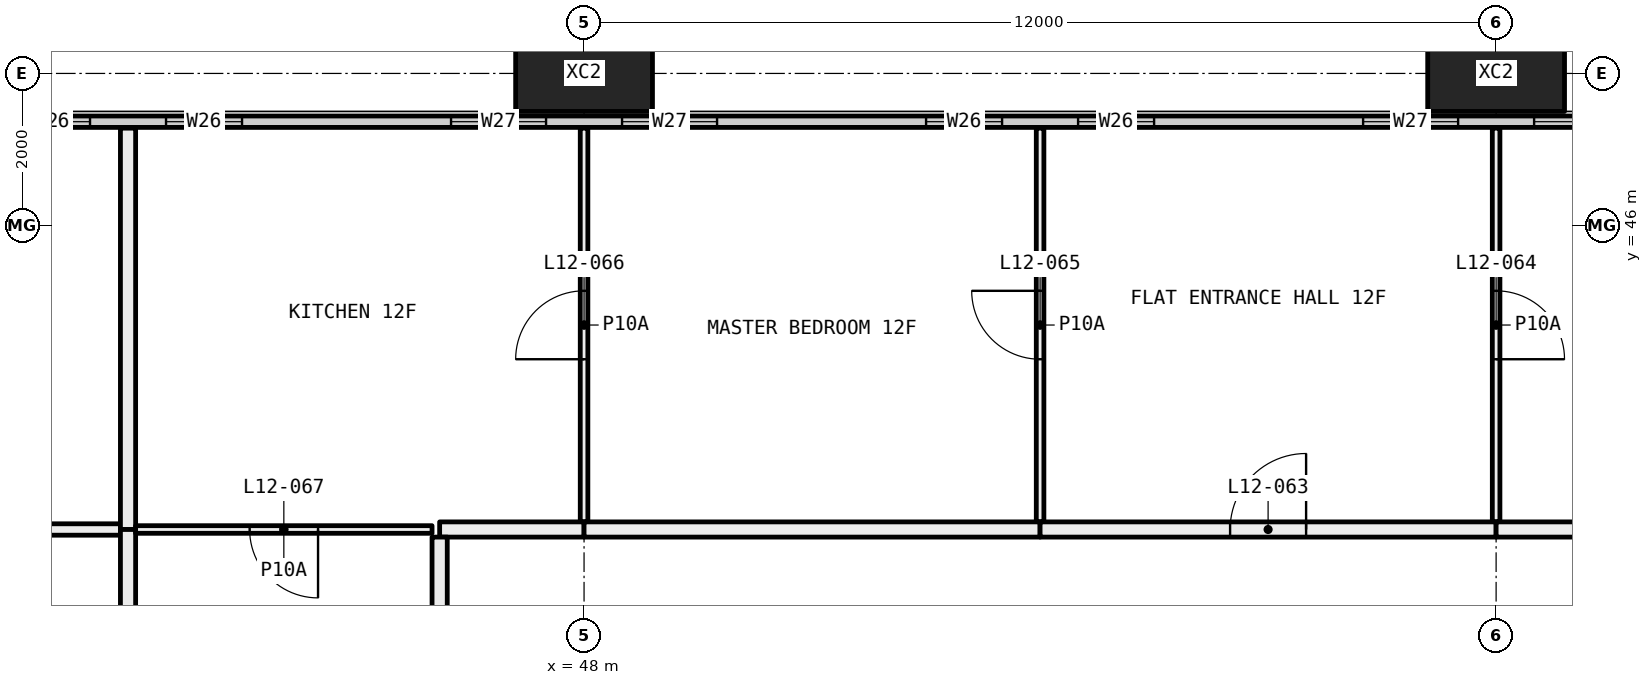
"""IFC4 building model, lengths in metres.
Left out: names, types, materials, properties, quantities, classifications, styles, units other than length and angle.
Written with IfcOpenShell. Run it as: python <this file> out.ifc"""

import sys

from ifc_helpers import new_model, si_unit, direction, frame, frame_2d, origin, origin_2d, place, context, subcontext, project, spatial, rectangle, hollow_rectangle, extrude, element, fill, save


model = new_model("IFC4")
c1 = context("Model", 3, precision=1e-05, world=origin(), true_north=direction((0.0, 1.0)))
c2 = subcontext(c1, "Body", "Model", "MODEL_VIEW")
j1 = project(units=[si_unit("LENGTHUNIT", "METRE"), si_unit("PLANEANGLEUNIT", "RADIAN")], contexts=[c1])
p1 = place(None, origin())
s1 = spatial("IfcSite", under=j1, at=p1, CompositionType="ELEMENT")
p2 = place(p1, origin())
s2 = spatial("IfcBuilding", under=s1, at=p2, CompositionType="ELEMENT")
p3 = place(p2, frame((0.0, 0.0, 54.15)))
s3 = spatial("IfcBuildingStorey", under=s2, at=p3, CompositionType="ELEMENT", Elevation=54.15)
for number, where, z_axis, x_axis in (
    (1, (48.0, 48.0, -0.4), (0.0, 0.0, 1.0), (1.0, 0.0, 0.0)),
    (2, (60.0, 48.0, -0.4), (0.0, 0.0, 1.0), (1.0, 0.0, 0.0)),
):
    element("IfcColumn", number, at=place(p3, frame(where, z_axis=z_axis, x_axis=x_axis)), inside=s3, PredefinedType="COLUMN", context=c2, shape_type="SweptSolid", body=[
        extrude(hollow_rectangle(XDim=1.8, YDim=1.0, WallThickness=0.07, at=origin_2d()), origin(), (0.0, 0.0, 1.0), 3.45),
    ])
p4 = place(p3, frame((6.56, 47.365, 0.0), z_axis=(0.0, 0.0, 1.0), x_axis=(1.0, 0.0, 0.0)))
e3 = element("IfcWall", 3, at=p4, inside=s3, PredefinedType="ELEMENTEDWALL", context=c2, shape_type="SweptSolid", body=[
    extrude(rectangle(XDim=58.88, YDim=0.15, at=frame_2d((29.44, 0.0))), origin(), (0.0, 0.0, 1.0), 3.05),
])
p5 = place(p4, frame((0.44, 0.0, 0.45)))
e4 = element("IfcOpeningElement", 4, at=p5, cuts=e3, PredefinedType="OPENING", context=c2, shape_type="SweptSolid", body=[
    extrude(rectangle(XDim=4.5, YDim=2.55, at=frame_2d((2.25, 1.275))), frame((0.0, 0.085, 0.0), z_axis=(0.0, -1.0, 0.0), x_axis=(1.0, 0.0, 0.0)), (0.0, 0.0, 1.0), 0.17),
])
p6 = place(p4, frame((5.94, 0.0, 0.45)))
e5 = element("IfcOpeningElement", 5, at=p6, cuts=e3, PredefinedType="OPENING", context=c2, shape_type="SweptSolid", body=[
    extrude(rectangle(XDim=1.25, YDim=2.55, at=frame_2d((0.625, 1.275))), frame((0.0, 0.085, 0.0), z_axis=(0.0, -1.0, 0.0), x_axis=(1.0, 0.0, 0.0)), (0.0, 0.0, 1.0), 0.17),
])
p7 = place(p4, frame((9.94, 0.0, 0.45)))
e6 = element("IfcOpeningElement", 6, at=p7, cuts=e3, PredefinedType="OPENING", context=c2, shape_type="SweptSolid", body=[
    extrude(rectangle(XDim=1.0, YDim=2.55, at=frame_2d((0.5, 1.275))), frame((0.0, 0.085, 0.0), z_axis=(0.0, -1.0, 0.0), x_axis=(1.0, 0.0, 0.0)), (0.0, 0.0, 1.0), 0.17),
])
p8 = place(p4, frame((11.94, 0.0, 0.45)))
e7 = element("IfcOpeningElement", 7, at=p8, cuts=e3, PredefinedType="OPENING", context=c2, shape_type="SweptSolid", body=[
    extrude(rectangle(XDim=1.0, YDim=2.55, at=frame_2d((0.5, 1.275))), frame((0.0, 0.085, 0.0), z_axis=(0.0, -1.0, 0.0), x_axis=(1.0, 0.0, 0.0)), (0.0, 0.0, 1.0), 0.17),
])
p9 = place(p4, frame((15.69, 0.0, 0.45)))
e8 = element("IfcOpeningElement", 8, at=p9, cuts=e3, PredefinedType="OPENING", context=c2, shape_type="SweptSolid", body=[
    extrude(rectangle(XDim=1.25, YDim=2.55, at=frame_2d((0.625, 1.275))), frame((0.0, 0.085, 0.0), z_axis=(0.0, -1.0, 0.0), x_axis=(1.0, 0.0, 0.0)), (0.0, 0.0, 1.0), 0.17),
])
p10 = place(p4, frame((17.94, 0.0, 0.45)))
e9 = element("IfcOpeningElement", 9, at=p10, cuts=e3, PredefinedType="OPENING", context=c2, shape_type="SweptSolid", body=[
    extrude(rectangle(XDim=1.25, YDim=2.55, at=frame_2d((0.625, 1.275))), frame((0.0, 0.085, 0.0), z_axis=(0.0, -1.0, 0.0), x_axis=(1.0, 0.0, 0.0)), (0.0, 0.0, 1.0), 0.17),
])
p11 = place(p4, frame((21.94, 0.0, 0.45)))
e10 = element("IfcOpeningElement", 10, at=p11, cuts=e3, PredefinedType="OPENING", context=c2, shape_type="SweptSolid", body=[
    extrude(rectangle(XDim=1.0, YDim=2.55, at=frame_2d((0.5, 1.275))), frame((0.0, 0.085, 0.0), z_axis=(0.0, -1.0, 0.0), x_axis=(1.0, 0.0, 0.0)), (0.0, 0.0, 1.0), 0.17),
])
p12 = place(p4, frame((23.94, 0.0, 0.45)))
e11 = element("IfcOpeningElement", 11, at=p12, cuts=e3, PredefinedType="OPENING", context=c2, shape_type="SweptSolid", body=[
    extrude(rectangle(XDim=1.0, YDim=2.55, at=frame_2d((0.5, 1.275))), frame((0.0, 0.085, 0.0), z_axis=(0.0, -1.0, 0.0), x_axis=(1.0, 0.0, 0.0)), (0.0, 0.0, 1.0), 0.17),
])
p13 = place(p4, frame((27.69, 0.0, 0.45)))
e12 = element("IfcOpeningElement", 12, at=p13, cuts=e3, PredefinedType="OPENING", context=c2, shape_type="SweptSolid", body=[
    extrude(rectangle(XDim=1.25, YDim=2.55, at=frame_2d((0.625, 1.275))), frame((0.0, 0.085, 0.0), z_axis=(0.0, -1.0, 0.0), x_axis=(1.0, 0.0, 0.0)), (0.0, 0.0, 1.0), 0.17),
])
p14 = place(p4, frame((29.94, 0.0, 0.45)))
e13 = element("IfcOpeningElement", 13, at=p14, cuts=e3, PredefinedType="OPENING", context=c2, shape_type="SweptSolid", body=[
    extrude(rectangle(XDim=1.25, YDim=2.55, at=frame_2d((0.625, 1.275))), frame((0.0, 0.085, 0.0), z_axis=(0.0, -1.0, 0.0), x_axis=(1.0, 0.0, 0.0)), (0.0, 0.0, 1.0), 0.17),
])
p15 = place(p4, frame((33.94, 0.0, 0.45)))
e14 = element("IfcOpeningElement", 14, at=p15, cuts=e3, PredefinedType="OPENING", context=c2, shape_type="SweptSolid", body=[
    extrude(rectangle(XDim=1.0, YDim=2.55, at=frame_2d((0.5, 1.275))), frame((0.0, 0.085, 0.0), z_axis=(0.0, -1.0, 0.0), x_axis=(1.0, 0.0, 0.0)), (0.0, 0.0, 1.0), 0.17),
])
p16 = place(p4, frame((35.94, 0.0, 0.45)))
e15 = element("IfcOpeningElement", 15, at=p16, cuts=e3, PredefinedType="OPENING", context=c2, shape_type="SweptSolid", body=[
    extrude(rectangle(XDim=1.0, YDim=2.55, at=frame_2d((0.5, 1.275))), frame((0.0, 0.085, 0.0), z_axis=(0.0, -1.0, 0.0), x_axis=(1.0, 0.0, 0.0)), (0.0, 0.0, 1.0), 0.17),
])
p17 = place(p4, frame((39.69, 0.0, 0.45)))
e16 = element("IfcOpeningElement", 16, at=p17, cuts=e3, PredefinedType="OPENING", context=c2, shape_type="SweptSolid", body=[
    extrude(rectangle(XDim=1.25, YDim=2.55, at=frame_2d((0.625, 1.275))), frame((0.0, 0.085, 0.0), z_axis=(0.0, -1.0, 0.0), x_axis=(1.0, 0.0, 0.0)), (0.0, 0.0, 1.0), 0.17),
])
p18 = place(p4, frame((41.94, 0.0, 0.45)))
e17 = element("IfcOpeningElement", 17, at=p18, cuts=e3, PredefinedType="OPENING", context=c2, shape_type="SweptSolid", body=[
    extrude(rectangle(XDim=1.25, YDim=2.55, at=frame_2d((0.625, 1.275))), frame((0.0, 0.085, 0.0), z_axis=(0.0, -1.0, 0.0), x_axis=(1.0, 0.0, 0.0)), (0.0, 0.0, 1.0), 0.17),
])
p19 = place(p4, frame((45.94, 0.0, 0.45)))
e18 = element("IfcOpeningElement", 18, at=p19, cuts=e3, PredefinedType="OPENING", context=c2, shape_type="SweptSolid", body=[
    extrude(rectangle(XDim=1.0, YDim=2.55, at=frame_2d((0.5, 1.275))), frame((0.0, 0.085, 0.0), z_axis=(0.0, -1.0, 0.0), x_axis=(1.0, 0.0, 0.0)), (0.0, 0.0, 1.0), 0.17),
])
p20 = place(p4, frame((47.94, 0.0, 0.45)))
e19 = element("IfcOpeningElement", 19, at=p20, cuts=e3, PredefinedType="OPENING", context=c2, shape_type="SweptSolid", body=[
    extrude(rectangle(XDim=1.0, YDim=2.55, at=frame_2d((0.5, 1.275))), frame((0.0, 0.085, 0.0), z_axis=(0.0, -1.0, 0.0), x_axis=(1.0, 0.0, 0.0)), (0.0, 0.0, 1.0), 0.17),
])
p21 = place(p4, frame((51.69, 0.0, 0.45)))
e20 = element("IfcOpeningElement", 20, at=p21, cuts=e3, PredefinedType="OPENING", context=c2, shape_type="SweptSolid", body=[
    extrude(rectangle(XDim=1.25, YDim=2.55, at=frame_2d((0.625, 1.275))), frame((0.0, 0.085, 0.0), z_axis=(0.0, -1.0, 0.0), x_axis=(1.0, 0.0, 0.0)), (0.0, 0.0, 1.0), 0.17),
])
p22 = place(p4, frame((53.94, 0.0, 0.45)))
e21 = element("IfcOpeningElement", 21, at=p22, cuts=e3, PredefinedType="OPENING", context=c2, shape_type="SweptSolid", body=[
    extrude(rectangle(XDim=4.5, YDim=2.55, at=frame_2d((2.25, 1.275))), frame((0.0, 0.085, 0.0), z_axis=(0.0, -1.0, 0.0), x_axis=(1.0, 0.0, 0.0)), (0.0, 0.0, 1.0), 0.17),
])
p23 = place(p3, frame((36.0, 42.0, 0.0), z_axis=(0.0, 0.0, 1.0), x_axis=(1.0, 0.0, 0.0)))
e22 = element("IfcWall", 22, at=p23, inside=s3, PredefinedType="PARTITIONING", context=c2, shape_type="SweptSolid", body=[
    extrude(rectangle(XDim=5.9, YDim=0.15, at=frame_2d((2.95, 0.0))), origin(), (0.0, 0.0, 1.0), 2.45),
])
p24 = place(p23, frame((2.5, 0.0, 0.0)))
e23 = element("IfcOpeningElement", 23, at=p24, cuts=e22, PredefinedType="OPENING", context=c2, shape_type="SweptSolid", body=[
    extrude(rectangle(XDim=0.9, YDim=2.1, at=frame_2d((0.45, 1.05))), frame((0.0, 0.085, 0.0), z_axis=(0.0, -1.0, 0.0), x_axis=(1.0, 0.0, 0.0)), (0.0, 0.0, 1.0), 0.17),
])
p25 = place(p3, frame((42.0, 42.0, 0.0), z_axis=(0.0, 0.0, 1.0), x_axis=(0.0, 1.0, 0.0)))
e24 = element("IfcWall", 24, at=p25, inside=s3, PredefinedType="PARTITIONING", context=c2, shape_type="SweptSolid", body=[
    extrude(rectangle(XDim=5.28, YDim=0.2, at=frame_2d((2.64, 0.0))), origin(), (0.0, 0.0, 1.0), 3.05),
])
p26 = place(p3, frame((42.0, 38.1, 0.0), z_axis=(0.0, 0.0, 1.0), x_axis=(0.0, 1.0, 0.0)))
e25 = element("IfcWall", 25, at=p26, inside=s3, PredefinedType="PARTITIONING", context=c2, shape_type="SweptSolid", body=[
    extrude(rectangle(XDim=3.9, YDim=0.2, at=frame_2d((1.95, 0.0))), origin(), (0.0, 0.0, 1.0), 3.05),
])
p27 = place(p3, frame((48.0, 42.1, 0.0), z_axis=(0.0, 0.0, 1.0), x_axis=(0.0, 1.0, 0.0)))
e26 = element("IfcWall", 26, at=p27, inside=s3, PredefinedType="PARTITIONING", context=c2, shape_type="SweptSolid", body=[
    extrude(rectangle(XDim=5.18, YDim=0.1, at=frame_2d((2.59, 0.0))), origin(), (0.0, 0.0, 1.0), 3.05),
])
p28 = place(p27, frame((2.14, 0.0, 0.0)))
e27 = element("IfcOpeningElement", 27, at=p28, cuts=e26, PredefinedType="OPENING", context=c2, shape_type="SweptSolid", body=[
    extrude(rectangle(XDim=0.9, YDim=2.1, at=frame_2d((0.45, 1.05))), frame((0.0, 0.06, 0.0), z_axis=(0.0, -1.0, 0.0), x_axis=(1.0, 0.0, 0.0)), (0.0, 0.0, 1.0), 0.12),
])
p29 = place(p3, frame((42.1, 42.0, 0.0), z_axis=(0.0, 0.0, 1.0), x_axis=(1.0, 0.0, 0.0)))
e28 = element("IfcWall", 28, at=p29, inside=s3, PredefinedType="PARTITIONING", context=c2, shape_type="SweptSolid", body=[
    extrude(rectangle(XDim=3.9, YDim=0.1, at=frame_2d((1.95, 0.0))), origin(), (0.0, 0.0, 1.0), 3.05),
])
p30 = place(p29, frame((1.5, 0.0, 0.0)))
e29 = element("IfcOpeningElement", 29, at=p30, cuts=e28, PredefinedType="OPENING", context=c2, shape_type="SweptSolid", body=[
    extrude(rectangle(XDim=0.9, YDim=2.1, at=frame_2d((0.45, 1.05))), frame((0.0, 0.06, 0.0), z_axis=(0.0, -1.0, 0.0), x_axis=(1.0, 0.0, 0.0)), (0.0, 0.0, 1.0), 0.12),
])
p31 = place(p3, frame((46.1, 42.0, 0.0), z_axis=(0.0, 0.0, 1.0), x_axis=(1.0, 0.0, 0.0)))
e30 = element("IfcWall", 30, at=p31, inside=s3, PredefinedType="PARTITIONING", context=c2, shape_type="SweptSolid", body=[
    extrude(rectangle(XDim=1.9, YDim=0.2, at=frame_2d((0.95, 0.0))), origin(), (0.0, 0.0, 1.0), 3.05),
])
p32 = place(p3, frame((54.0, 42.1, 0.0), z_axis=(0.0, 0.0, 1.0), x_axis=(0.0, 1.0, 0.0)))
e31 = element("IfcWall", 31, at=p32, inside=s3, PredefinedType="PARTITIONING", context=c2, shape_type="SweptSolid", body=[
    extrude(rectangle(XDim=5.18, YDim=0.1, at=frame_2d((2.59, 0.0))), origin(), (0.0, 0.0, 1.0), 3.05),
])
p33 = place(p32, frame((2.14, 0.0, 0.0)))
e32 = element("IfcOpeningElement", 32, at=p33, cuts=e31, PredefinedType="OPENING", context=c2, shape_type="SweptSolid", body=[
    extrude(rectangle(XDim=0.9, YDim=2.1, at=frame_2d((0.45, 1.05))), frame((0.0, 0.06, 0.0), z_axis=(0.0, -1.0, 0.0), x_axis=(1.0, 0.0, 0.0)), (0.0, 0.0, 1.0), 0.12),
])
p34 = place(p3, frame((48.0, 42.0, 0.0), z_axis=(0.0, 0.0, 1.0), x_axis=(1.0, 0.0, 0.0)))
e33 = element("IfcWall", 33, at=p34, inside=s3, PredefinedType="PARTITIONING", context=c2, shape_type="SweptSolid", body=[
    extrude(rectangle(XDim=6.0, YDim=0.2, at=frame_2d((3.0, 0.0))), origin(), (0.0, 0.0, 1.0), 3.05),
])
p35 = place(p3, frame((60.0, 42.1, 0.0), z_axis=(0.0, 0.0, 1.0), x_axis=(0.0, 1.0, 0.0)))
e34 = element("IfcWall", 34, at=p35, inside=s3, PredefinedType="PARTITIONING", context=c2, shape_type="SweptSolid", body=[
    extrude(rectangle(XDim=5.18, YDim=0.1, at=frame_2d((2.59, 0.0))), origin(), (0.0, 0.0, 1.0), 3.05),
])
p36 = place(p35, frame((2.14, 0.0, 0.0)))
e35 = element("IfcOpeningElement", 35, at=p36, cuts=e34, PredefinedType="OPENING", context=c2, shape_type="SweptSolid", body=[
    extrude(rectangle(XDim=0.9, YDim=2.1, at=frame_2d((0.45, 1.05))), frame((0.0, 0.06, 0.0), z_axis=(0.0, -1.0, 0.0), x_axis=(1.0, 0.0, 0.0)), (0.0, 0.0, 1.0), 0.12),
])
p37 = place(p3, frame((54.0, 42.0, 0.0), z_axis=(0.0, 0.0, 1.0), x_axis=(1.0, 0.0, 0.0)))
e36 = element("IfcWall", 36, at=p37, inside=s3, PredefinedType="PARTITIONING", context=c2, shape_type="SweptSolid", body=[
    extrude(rectangle(XDim=6.0, YDim=0.2, at=frame_2d((3.0, 0.0))), origin(), (0.0, 0.0, 1.0), 3.05),
])
p38 = place(p37, frame((2.5, 0.0, 0.0)))
e37 = element("IfcOpeningElement", 37, at=p38, cuts=e36, PredefinedType="OPENING", context=c2, shape_type="SweptSolid", body=[
    extrude(rectangle(XDim=1.0, YDim=2.1, at=frame_2d((0.5, 1.05))), frame((0.0, 0.11, 0.0), z_axis=(0.0, -1.0, 0.0), x_axis=(1.0, 0.0, 0.0)), (0.0, 0.0, 1.0), 0.22),
])
p39 = place(p3, frame((60.0, 42.0, 0.0), z_axis=(0.0, 0.0, 1.0), x_axis=(1.0, 0.0, 0.0)))
e38 = element("IfcWall", 38, at=p39, inside=s3, PredefinedType="PARTITIONING", context=c2, shape_type="SweptSolid", body=[
    extrude(rectangle(XDim=1.9, YDim=0.2, at=frame_2d((0.95, 0.0))), origin(), (0.0, 0.0, 1.0), 3.05),
])
p40 = place(p3, frame((46.1, 36.1, 0.0), z_axis=(0.0, 0.0, 1.0), x_axis=(0.0, 1.0, 0.0)))
e39 = element("IfcWall", 39, at=p40, inside=s3, PredefinedType="PARTITIONING", context=c2, shape_type="SweptSolid", body=[
    extrude(rectangle(XDim=5.8, YDim=0.2, at=frame_2d((2.9, 0.0))), origin(), (0.0, 0.0, 1.0), 3.05),
])
p41 = place(p15, origin())
e40 = element("IfcWindow", 40, at=p41, inside=s3, PartitioningType="SINGLE_PANEL", PredefinedType="WINDOW", context=c2, shape_type="SweptSolid", body=[
    extrude(rectangle(XDim=1.0, YDim=2.55, at=frame_2d((0.5, 1.275))), frame((0.0, 0.03, 0.0), z_axis=(0.0, -1.0, 0.0), x_axis=(1.0, 0.0, 0.0)), (0.0, 0.0, 1.0), 0.06),
])
fill(e14, e40)
p42 = place(p16, origin())
e41 = element("IfcWindow", 41, at=p42, inside=s3, PartitioningType="SINGLE_PANEL", PredefinedType="WINDOW", context=c2, shape_type="SweptSolid", body=[
    extrude(rectangle(XDim=1.0, YDim=2.55, at=frame_2d((0.5, 1.275))), frame((0.0, 0.03, 0.0), z_axis=(0.0, -1.0, 0.0), x_axis=(1.0, 0.0, 0.0)), (0.0, 0.0, 1.0), 0.06),
])
fill(e15, e41)
p43 = place(p17, origin())
e42 = element("IfcWindow", 42, at=p43, inside=s3, PartitioningType="SINGLE_PANEL", PredefinedType="WINDOW", context=c2, shape_type="SweptSolid", body=[
    extrude(rectangle(XDim=1.25, YDim=2.55, at=frame_2d((0.625, 1.275))), frame((0.0, 0.03, 0.0), z_axis=(0.0, -1.0, 0.0), x_axis=(1.0, 0.0, 0.0)), (0.0, 0.0, 1.0), 0.06),
])
fill(e16, e42)
p44 = place(p18, origin())
e43 = element("IfcWindow", 43, at=p44, inside=s3, PartitioningType="SINGLE_PANEL", PredefinedType="WINDOW", context=c2, shape_type="SweptSolid", body=[
    extrude(rectangle(XDim=1.25, YDim=2.55, at=frame_2d((0.625, 1.275))), frame((0.0, 0.03, 0.0), z_axis=(0.0, -1.0, 0.0), x_axis=(1.0, 0.0, 0.0)), (0.0, 0.0, 1.0), 0.06),
])
fill(e17, e43)
p45 = place(p19, origin())
e44 = element("IfcWindow", 44, at=p45, inside=s3, PartitioningType="SINGLE_PANEL", PredefinedType="WINDOW", context=c2, shape_type="SweptSolid", body=[
    extrude(rectangle(XDim=1.0, YDim=2.55, at=frame_2d((0.5, 1.275))), frame((0.0, 0.03, 0.0), z_axis=(0.0, -1.0, 0.0), x_axis=(1.0, 0.0, 0.0)), (0.0, 0.0, 1.0), 0.06),
])
fill(e18, e44)
p46 = place(p20, origin())
e45 = element("IfcWindow", 45, at=p46, inside=s3, PartitioningType="SINGLE_PANEL", PredefinedType="WINDOW", context=c2, shape_type="SweptSolid", body=[
    extrude(rectangle(XDim=1.0, YDim=2.55, at=frame_2d((0.5, 1.275))), frame((0.0, 0.03, 0.0), z_axis=(0.0, -1.0, 0.0), x_axis=(1.0, 0.0, 0.0)), (0.0, 0.0, 1.0), 0.06),
])
fill(e19, e45)
p47 = place(p21, origin())
e46 = element("IfcWindow", 46, at=p47, inside=s3, PartitioningType="SINGLE_PANEL", PredefinedType="WINDOW", context=c2, shape_type="SweptSolid", body=[
    extrude(rectangle(XDim=1.25, YDim=2.55, at=frame_2d((0.625, 1.275))), frame((0.0, 0.03, 0.0), z_axis=(0.0, -1.0, 0.0), x_axis=(1.0, 0.0, 0.0)), (0.0, 0.0, 1.0), 0.06),
])
fill(e20, e46)
p48 = place(p22, origin())
e47 = element("IfcWindow", 47, at=p48, inside=s3, PartitioningType="SINGLE_PANEL", PredefinedType="WINDOW", context=c2, shape_type="SweptSolid", body=[
    extrude(rectangle(XDim=4.5, YDim=2.55, at=frame_2d((2.25, 1.275))), frame((0.0, 0.03, 0.0), z_axis=(0.0, -1.0, 0.0), x_axis=(1.0, 0.0, 0.0)), (0.0, 0.0, 1.0), 0.06),
])
fill(e21, e47)
p49 = place(p38, origin())
e48 = element("IfcDoor", 48, at=p49, inside=s3, OperationType="SINGLE_SWING_LEFT", PredefinedType="DOOR", context=c2, shape_type="SweptSolid", body=[
    extrude(rectangle(XDim=1.0, YDim=2.1, at=frame_2d((0.5, 1.05))), frame((0.0, 0.025, 0.0), z_axis=(0.0, -1.0, 0.0), x_axis=(1.0, 0.0, 0.0)), (0.0, 0.0, 1.0), 0.05),
])
fill(e37, e48)
p50 = place(p36, frame((0.9, 0.0, 0.0), x_axis=(-1.0, 0.0, 0.0)))
e49 = element("IfcDoor", 49, at=p50, inside=s3, OperationType="SINGLE_SWING_LEFT", PredefinedType="DOOR", context=c2, shape_type="SweptSolid", body=[
    extrude(rectangle(XDim=0.9, YDim=2.1, at=frame_2d((0.45, 1.05))), frame((0.0, 0.025, 0.0), z_axis=(0.0, -1.0, 0.0), x_axis=(1.0, 0.0, 0.0)), (0.0, 0.0, 1.0), 0.05),
])
fill(e35, e49)
p51 = place(p33, origin())
e50 = element("IfcDoor", 50, at=p51, inside=s3, OperationType="SINGLE_SWING_LEFT", PredefinedType="DOOR", context=c2, shape_type="SweptSolid", body=[
    extrude(rectangle(XDim=0.9, YDim=2.1, at=frame_2d((0.45, 1.05))), frame((0.0, 0.025, 0.0), z_axis=(0.0, -1.0, 0.0), x_axis=(1.0, 0.0, 0.0)), (0.0, 0.0, 1.0), 0.05),
])
fill(e32, e50)
p52 = place(p28, origin())
e51 = element("IfcDoor", 51, at=p52, inside=s3, OperationType="SINGLE_SWING_RIGHT", PredefinedType="DOOR", context=c2, shape_type="SweptSolid", body=[
    extrude(rectangle(XDim=0.9, YDim=2.1, at=frame_2d((0.45, 1.05))), frame((0.0, 0.025, 0.0), z_axis=(0.0, -1.0, 0.0), x_axis=(1.0, 0.0, 0.0)), (0.0, 0.0, 1.0), 0.05),
])
fill(e27, e51)
p53 = place(p30, frame((0.9, 0.0, 0.0), x_axis=(-1.0, 0.0, 0.0)))
e52 = element("IfcDoor", 52, at=p53, inside=s3, OperationType="SINGLE_SWING_RIGHT", PredefinedType="DOOR", context=c2, shape_type="SweptSolid", body=[
    extrude(rectangle(XDim=0.9, YDim=2.1, at=frame_2d((0.45, 1.05))), frame((0.0, 0.025, 0.0), z_axis=(0.0, -1.0, 0.0), x_axis=(1.0, 0.0, 0.0)), (0.0, 0.0, 1.0), 0.05),
])
fill(e29, e52)
save(model, sys.argv[1])
